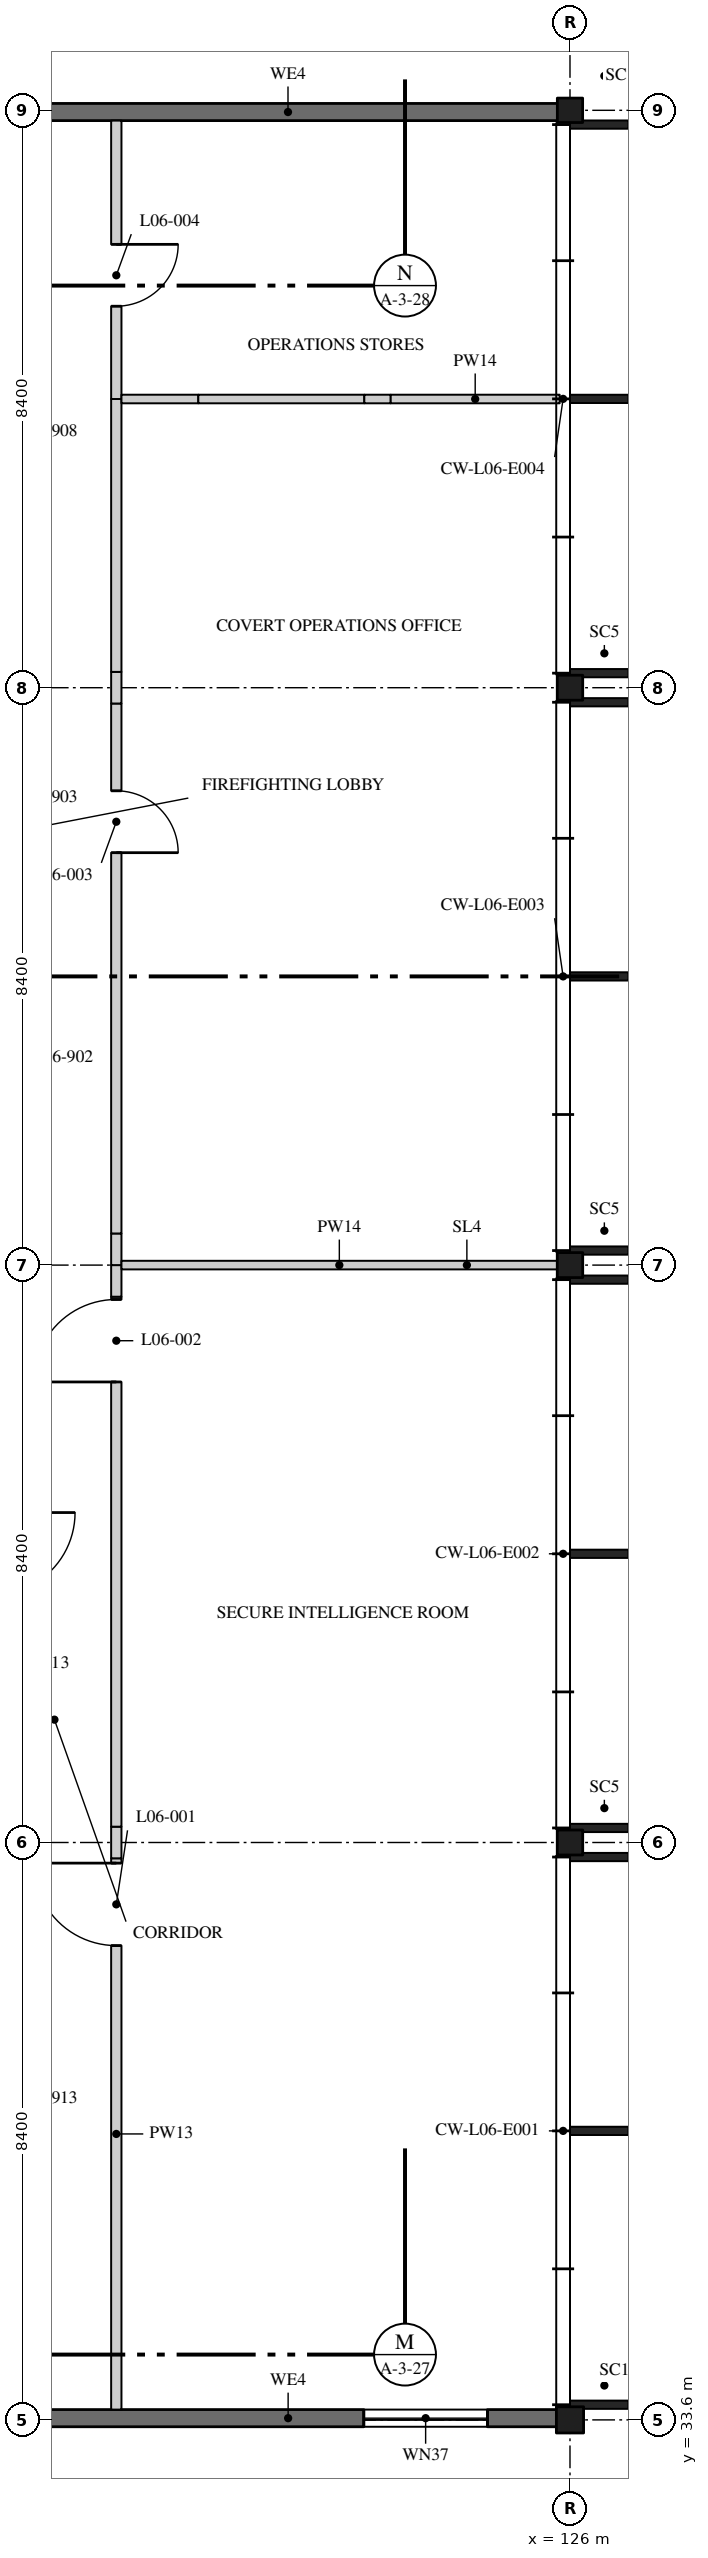
"""IFC4 building model, lengths in metres.
Left out: names, types, materials, properties, quantities, classifications, styles, units other than length and angle.
Written with IfcOpenShell. Run it as: python <this file> out.ifc"""

import sys

from ifc_helpers import new_model, si_unit, direction, frame, frame_2d, origin, origin_2d, place, context, subcontext, project, spatial, rectangle, i_section, extrude, element, fill, save


model = new_model("IFC4")
c1 = context("Model", 3, precision=1e-05, world=origin(), true_north=direction((0.0, 1.0)))
c2 = subcontext(c1, "Body", "Model", "MODEL_VIEW")
j1 = project(units=[si_unit("LENGTHUNIT", "METRE"), si_unit("PLANEANGLEUNIT", "RADIAN")], contexts=[c1])
p1 = place(None, origin())
s1 = spatial("IfcSite", under=j1, at=p1, CompositionType="ELEMENT")
p2 = place(p1, origin())
s2 = spatial("IfcBuilding", under=s1, at=p2, CompositionType="ELEMENT")
p3 = place(p2, frame((0.0, 0.0, 27.9)))
s3 = spatial("IfcBuildingStorey", under=s2, at=p3, CompositionType="ELEMENT", Elevation=27.9)
p4 = place(p3, frame((126.0, 33.6, 0.0), z_axis=(0.0, 0.0, 1.0), x_axis=(1.0, 0.0, 0.0)))
e1 = element("IfcColumn", 1, at=p4, inside=s3, PredefinedType="COLUMN", context=c2, shape_type="SweptSolid", body=[
    extrude(i_section(OverallWidth=0.396, OverallDepth=0.381, WebThickness=0.019, FlangeThickness=0.03, FilletRadius=0.015, at=origin_2d()), origin(), (0.0, 0.0, 1.0), 4.37),
])
for number, where, z_axis, x_axis in (
    (2, (126.0, 42.0, 0.0), (0.0, 0.0, 1.0), (1.0, 0.0, 0.0)),
    (3, (126.0, 50.4, 0.0), (0.0, 0.0, 1.0), (1.0, 0.0, 0.0)),
    (4, (126.0, 58.8, 0.0), (0.0, 0.0, 1.0), (1.0, 0.0, 0.0)),
):
    element("IfcColumn", number, at=place(p3, frame(where, z_axis=z_axis, x_axis=x_axis)), inside=s3, PredefinedType="COLUMN", context=c2, shape_type="SweptSolid", body=[
        extrude(i_section(OverallWidth=0.371, OverallDepth=0.363, WebThickness=0.013, FlangeThickness=0.022, FilletRadius=0.015, at=origin_2d()), origin(), (0.0, 0.0, 1.0), 4.37),
    ])
p5 = place(p3, frame((126.0, 67.2, 0.0), z_axis=(0.0, 0.0, 1.0), x_axis=(1.0, 0.0, 0.0)))
e5 = element("IfcColumn", 5, at=p5, inside=s3, PredefinedType="COLUMN", context=c2, shape_type="SweptSolid", body=[
    extrude(i_section(OverallWidth=0.368, OverallDepth=0.356, WebThickness=0.011, FlangeThickness=0.018, FilletRadius=0.015, at=origin_2d()), origin(), (0.0, 0.0, 1.0), 4.37),
])
p6 = place(p3, frame((119.4, 33.75, 0.0), z_axis=(0.0, 0.0, 1.0), x_axis=(0.0, 1.0, 0.0)))
e6 = element("IfcWall", 6, at=p6, inside=s3, PredefinedType="PARTITIONING", context=c2, shape_type="SweptSolid", body=[
    extrude(rectangle(XDim=8.02, YDim=0.15, at=frame_2d((4.01, 0.0))), origin(), (0.0, 0.0, 1.0), 4.37),
])
p7 = place(p6, frame((6.75, 0.0, 0.0)))
e7 = element("IfcOpeningElement", 7, at=p7, cuts=e6, PredefinedType="OPENING", context=c2, shape_type="SweptSolid", body=[
    extrude(rectangle(XDim=1.2, YDim=2.4, at=frame_2d((0.6, 1.2))), frame((0.0, 0.085, 0.0), z_axis=(0.0, -1.0, 0.0), x_axis=(1.0, 0.0, 0.0)), (0.0, 0.0, 1.0), 0.17),
])
p8 = place(p3, frame((119.4, 41.77, 0.0), z_axis=(0.0, 0.0, 1.0), x_axis=(0.0, 1.0, 0.0)))
e8 = element("IfcWall", 8, at=p8, inside=s3, PredefinedType="PARTITIONING", context=c2, shape_type="SweptSolid", body=[
    extrude(rectangle(XDim=0.46, YDim=0.15, at=frame_2d((0.23, 0.0))), origin(), (0.0, 0.0, 1.0), 3.746),
])
p9 = place(p3, frame((119.4, 42.23, 0.0), z_axis=(0.0, 0.0, 1.0), x_axis=(0.0, 1.0, 0.0)))
e9 = element("IfcWall", 9, at=p9, inside=s3, PredefinedType="PARTITIONING", context=c2, shape_type="SweptSolid", body=[
    extrude(rectangle(XDim=7.71, YDim=0.15, at=frame_2d((3.855, 0.0))), origin(), (0.0, 0.0, 1.0), 4.37),
])
p10 = place(p9, frame((6.47, 0.0, 0.0)))
e10 = element("IfcOpeningElement", 10, at=p10, cuts=e9, PredefinedType="OPENING", context=c2, shape_type="SweptSolid", body=[
    extrude(rectangle(XDim=1.2, YDim=2.4, at=frame_2d((0.6, 1.2))), frame((0.0, 0.085, 0.0), z_axis=(0.0, -1.0, 0.0), x_axis=(1.0, 0.0, 0.0)), (0.0, 0.0, 1.0), 0.17),
])
p11 = place(p3, frame((119.4, 49.94, 0.0), z_axis=(0.0, 0.0, 1.0), x_axis=(0.0, 1.0, 0.0)))
e11 = element("IfcWall", 11, at=p11, inside=s3, PredefinedType="PARTITIONING", context=c2, shape_type="SweptSolid", body=[
    extrude(rectangle(XDim=0.46, YDim=0.15, at=frame_2d((0.23, 0.0))), origin(), (0.0, 0.0, 1.0), 3.746),
])
p12 = place(p3, frame((119.4, 50.4, 0.0), z_axis=(0.0, 0.0, 1.0), x_axis=(0.0, 1.0, 0.0)))
e12 = element("IfcWall", 12, at=p12, inside=s3, PredefinedType="PARTITIONING", context=c2, shape_type="SweptSolid", body=[
    extrude(rectangle(XDim=0.46, YDim=0.15, at=frame_2d((0.23, 0.0))), origin(), (0.0, 0.0, 1.0), 3.746),
])
p13 = place(p3, frame((119.4, 50.86, 0.0), z_axis=(0.0, 0.0, 1.0), x_axis=(0.0, 1.0, 0.0)))
e13 = element("IfcWall", 13, at=p13, inside=s3, PredefinedType="PARTITIONING", context=c2, shape_type="SweptSolid", body=[
    extrude(rectangle(XDim=7.71, YDim=0.15, at=frame_2d((3.855, 0.0))), origin(), (0.0, 0.0, 1.0), 4.37),
])
p14 = place(p13, frame((5.54, 0.0, 0.0)))
e14 = element("IfcOpeningElement", 14, at=p14, cuts=e13, PredefinedType="OPENING", context=c2, shape_type="SweptSolid", body=[
    extrude(rectangle(XDim=0.9, YDim=2.1, at=frame_2d((0.45, 1.05))), frame((0.0, 0.085, 0.0), z_axis=(0.0, -1.0, 0.0), x_axis=(1.0, 0.0, 0.0)), (0.0, 0.0, 1.0), 0.17),
])
p15 = place(p3, frame((119.4, 58.57, 0.0), z_axis=(0.0, 0.0, 1.0), x_axis=(0.0, 1.0, 0.0)))
e15 = element("IfcWall", 15, at=p15, inside=s3, PredefinedType="PARTITIONING", context=c2, shape_type="SweptSolid", body=[
    extrude(rectangle(XDim=0.46, YDim=0.15, at=frame_2d((0.23, 0.0))), origin(), (0.0, 0.0, 1.0), 3.746),
])
p16 = place(p3, frame((119.4, 59.03, 0.0), z_axis=(0.0, 0.0, 1.0), x_axis=(0.0, 1.0, 0.0)))
e16 = element("IfcWall", 16, at=p16, inside=s3, PredefinedType="PARTITIONING", context=c2, shape_type="SweptSolid", body=[
    extrude(rectangle(XDim=3.97, YDim=0.15, at=frame_2d((1.985, 0.0))), origin(), (0.0, 0.0, 1.0), 4.37),
])
p17 = place(p3, frame((119.4, 63.0, 0.0), z_axis=(0.0, 0.0, 1.0), x_axis=(0.0, 1.0, 0.0)))
e17 = element("IfcWall", 17, at=p17, inside=s3, PredefinedType="PARTITIONING", context=c2, shape_type="SweptSolid", body=[
    extrude(rectangle(XDim=4.05, YDim=0.15, at=frame_2d((2.025, 0.0))), origin(), (0.0, 0.0, 1.0), 4.37),
])
p18 = place(p17, frame((1.35, 0.0, 0.0)))
e18 = element("IfcOpeningElement", 18, at=p18, cuts=e17, PredefinedType="OPENING", context=c2, shape_type="SweptSolid", body=[
    extrude(rectangle(XDim=0.9, YDim=2.1, at=frame_2d((0.45, 1.05))), frame((0.0, 0.085, 0.0), z_axis=(0.0, -1.0, 0.0), x_axis=(1.0, 0.0, 0.0)), (0.0, 0.0, 1.0), 0.17),
])
p19 = place(p3, frame((119.475, 50.4, 0.0), z_axis=(0.0, 0.0, 1.0), x_axis=(1.0, 0.0, 0.0)))
e19 = element("IfcWall", 19, at=p19, inside=s3, PredefinedType="PARTITIONING", context=c2, shape_type="SweptSolid", body=[
    extrude(rectangle(XDim=6.339, YDim=0.125, at=frame_2d((3.169, 0.0))), origin(), (0.0, 0.0, 1.0), 3.746),
])
p20 = place(p3, frame((119.475, 63.0, 0.0), z_axis=(0.0, 0.0, 1.0), x_axis=(1.0, 0.0, 0.0)))
e20 = element("IfcWall", 20, at=p20, inside=s3, PredefinedType="PARTITIONING", context=c2, shape_type="SweptSolid", body=[
    extrude(rectangle(XDim=1.118, YDim=0.125, at=frame_2d((0.559, 0.0))), origin(), (0.0, 0.0, 1.0), 3.895),
])
p21 = place(p3, frame((120.593, 63.0, 0.0), z_axis=(0.0, 0.0, 1.0), x_axis=(1.0, 0.0, 0.0)))
e21 = element("IfcWall", 21, at=p21, inside=s3, PredefinedType="PARTITIONING", context=c2, shape_type="SweptSolid", body=[
    extrude(rectangle(XDim=2.415, YDim=0.125, at=frame_2d((1.208, 0.0))), origin(), (0.0, 0.0, 1.0), 4.37),
])
p22 = place(p3, frame((123.008, 63.0, 0.0), z_axis=(0.0, 0.0, 1.0), x_axis=(1.0, 0.0, 0.0)))
e22 = element("IfcWall", 22, at=p22, inside=s3, PredefinedType="PARTITIONING", context=c2, shape_type="SweptSolid", body=[
    extrude(rectangle(XDim=0.384, YDim=0.125, at=frame_2d((0.192, 0.0))), origin(), (0.0, 0.0, 1.0), 3.895),
])
p23 = place(p3, frame((123.392, 63.0, 0.0), z_axis=(0.0, 0.0, 1.0), x_axis=(1.0, 0.0, 0.0)))
e23 = element("IfcWall", 23, at=p23, inside=s3, PredefinedType="PARTITIONING", context=c2, shape_type="SweptSolid", body=[
    extrude(rectangle(XDim=2.458, YDim=0.125, at=frame_2d((1.229, 0.0))), origin(), (0.0, 0.0, 1.0), 4.37),
])
p24 = place(p3, frame((125.996, 67.175, 0.0), z_axis=(0.0, 0.0, 1.0), x_axis=(-1.0, 0.0, 0.0)))
e24 = element("IfcWall", 24, at=p24, inside=s3, PredefinedType="SOLIDWALL", context=c2, shape_type="SweptSolid", body=[
    extrude(rectangle(XDim=8.196, YDim=0.25, at=frame_2d((4.098, 0.0))), origin(), (0.0, 0.0, 1.0), 3.746),
])
p25 = place(p3, frame((117.8, 33.625, 0.0), z_axis=(0.0, 0.0, 1.0), x_axis=(1.0, 0.0, 0.0)))
e25 = element("IfcWall", 25, at=p25, inside=s3, PredefinedType="SOLIDWALL", context=c2, shape_type="SweptSolid", body=[
    extrude(rectangle(XDim=8.199, YDim=0.25, at=frame_2d((4.1, 0.0))), origin(), (0.0, 0.0, 1.0), 3.746),
])
p26 = place(p25, frame((5.2, 0.0, 0.9)))
e26 = element("IfcOpeningElement", 26, at=p26, cuts=e25, PredefinedType="OPENING", context=c2, shape_type="SweptSolid", body=[
    extrude(rectangle(XDim=1.8, YDim=1.95, at=frame_2d((0.9, 0.975))), frame((0.0, 0.135, 0.0), z_axis=(0.0, -1.0, 0.0), x_axis=(1.0, 0.0, 0.0)), (0.0, 0.0, 1.0), 0.27),
])
p27 = place(p7, origin())
e27 = element("IfcDoor", 27, at=p27, inside=s3, OperationType="SINGLE_SWING_LEFT", PredefinedType="DOOR", context=c2, shape_type="SweptSolid", body=[
    extrude(rectangle(XDim=1.2, YDim=2.4, at=frame_2d((0.6, 1.2))), frame((0.0, 0.025, 0.0), z_axis=(0.0, -1.0, 0.0), x_axis=(1.0, 0.0, 0.0)), (0.0, 0.0, 1.0), 0.05),
])
fill(e7, e27)
p28 = place(p10, origin())
e28 = element("IfcDoor", 28, at=p28, inside=s3, OperationType="SINGLE_SWING_RIGHT", PredefinedType="DOOR", context=c2, shape_type="SweptSolid", body=[
    extrude(rectangle(XDim=1.2, YDim=2.4, at=frame_2d((0.6, 1.2))), frame((0.0, 0.025, 0.0), z_axis=(0.0, -1.0, 0.0), x_axis=(1.0, 0.0, 0.0)), (0.0, 0.0, 1.0), 0.05),
])
fill(e10, e28)
p29 = place(p14, frame((0.9, 0.0, 0.0), z_axis=(0.0, 0.0, 1.0), x_axis=(-1.0, 0.0, 0.0)))
e29 = element("IfcDoor", 29, at=p29, inside=s3, OperationType="SINGLE_SWING_LEFT", PredefinedType="DOOR", context=c2, shape_type="SweptSolid", body=[
    extrude(rectangle(XDim=0.9, YDim=2.1, at=frame_2d((0.45, 1.05))), frame((0.0, 0.025, 0.0), z_axis=(0.0, -1.0, 0.0), x_axis=(1.0, 0.0, 0.0)), (0.0, 0.0, 1.0), 0.05),
])
fill(e14, e29)
p30 = place(p18, frame((0.9, 0.0, 0.0), z_axis=(0.0, 0.0, 1.0), x_axis=(-1.0, 0.0, 0.0)))
e30 = element("IfcDoor", 30, at=p30, inside=s3, OperationType="SINGLE_SWING_RIGHT", PredefinedType="DOOR", context=c2, shape_type="SweptSolid", body=[
    extrude(rectangle(XDim=0.9, YDim=2.1, at=frame_2d((0.45, 1.05))), frame((0.0, 0.025, 0.0), z_axis=(0.0, -1.0, 0.0), x_axis=(1.0, 0.0, 0.0)), (0.0, 0.0, 1.0), 0.05),
])
fill(e18, e30)
p31 = place(p26, origin())
e31 = element("IfcWindow", 31, at=p31, inside=s3, PartitioningType="SINGLE_PANEL", PredefinedType="WINDOW", context=c2, shape_type="SweptSolid", body=[
    extrude(rectangle(XDim=1.8, YDim=1.95, at=frame_2d((0.9, 0.975))), frame((0.0, 0.04, 0.0), z_axis=(0.0, -1.0, 0.0), x_axis=(1.0, 0.0, 0.0)), (0.0, 0.0, 1.0), 0.08),
])
fill(e26, e31)
save(model, sys.argv[1])
